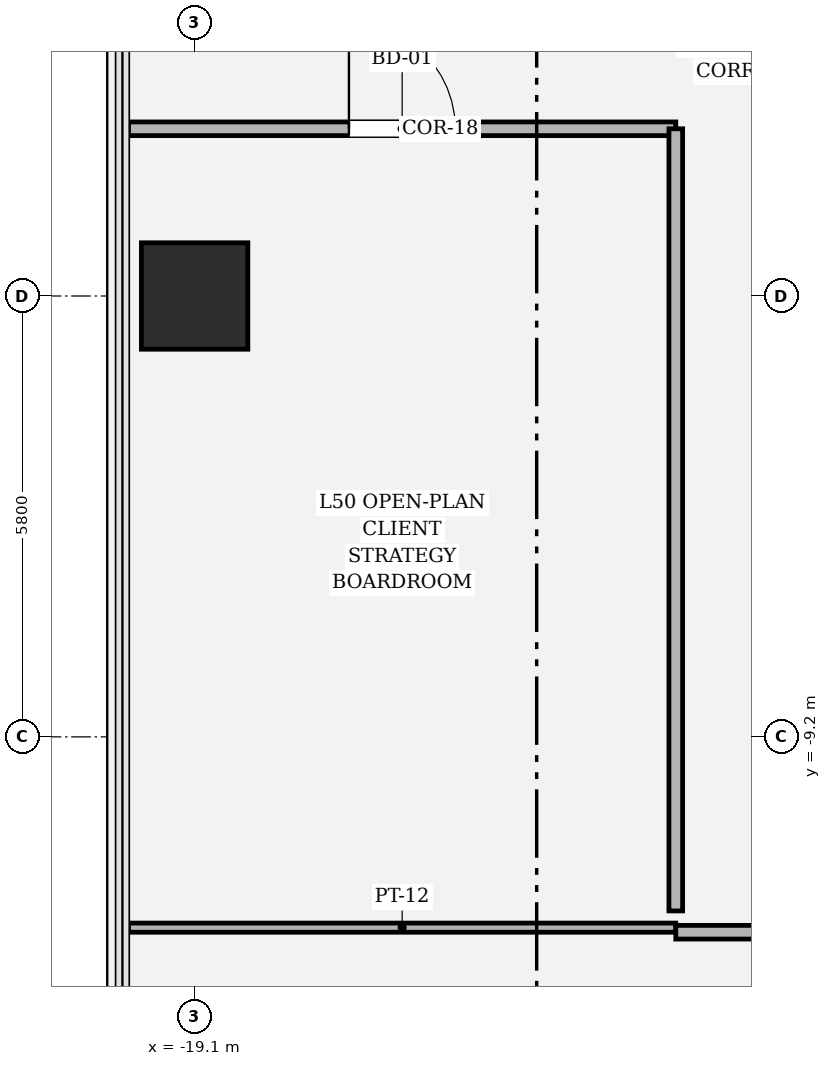
"""IFC4 building model, lengths in metres.
Left out: names, types, materials, properties, quantities, classifications, styles, units other than length and angle.
Written with IfcOpenShell. Run it as: python <this file> out.ifc"""

import sys

from ifc_helpers import new_model, si_unit, direction, frame, frame_2d, origin, origin_2d, place, context, subcontext, project, spatial, rectangle, hollow_rectangle, extrude, element, fill, save


model = new_model("IFC4")
c1 = context("Model", 3, precision=1e-05, world=origin(), true_north=direction((0.0, 1.0)))
c2 = subcontext(c1, "Body", "Model", "MODEL_VIEW")
j1 = project(units=[si_unit("LENGTHUNIT", "METRE"), si_unit("PLANEANGLEUNIT", "RADIAN")], contexts=[c1])
p1 = place(None, origin())
s1 = spatial("IfcSite", under=j1, at=p1, CompositionType="ELEMENT")
p2 = place(p1, origin())
s2 = spatial("IfcBuilding", under=s1, at=p2, CompositionType="ELEMENT")
p3 = place(p2, frame((0.0, 0.0, 212.7)))
s3 = spatial("IfcBuildingStorey", under=s2, at=p3, CompositionType="ELEMENT", Elevation=212.7)
p4 = place(p3, frame((-19.1, -3.4, 0.0), z_axis=(0.0, 0.0, 1.0), x_axis=(1.0, 0.0, 0.0)))
e1 = element("IfcColumn", 1, at=p4, inside=s3, PredefinedType="COLUMN", context=c2, shape_type="SweptSolid", body=[
    extrude(hollow_rectangle(XDim=1.4, YDim=1.4, WallThickness=0.042, at=origin_2d()), origin(), (0.0, 0.0, 1.0), 4.05),
])
p5 = place(p3, frame((-19.97, -11.71, 0.0), z_axis=(0.0, 0.0, 1.0), x_axis=(1.0, 0.0, 0.0)))
e2 = element("IfcWall", 2, at=p5, inside=s3, PredefinedType="PARTITIONING", context=c2, shape_type="SweptSolid", body=[
    extrude(rectangle(XDim=7.2, YDim=0.12, at=frame_2d((3.6, 0.0))), origin(), (0.0, 0.0, 1.0), 3.174),
])
p6 = place(p3, frame((-12.77, -11.77, 0.0), z_axis=(0.0, 0.0, 1.0), x_axis=(1.0, 0.0, 0.0)))
e3 = element("IfcWall", 3, at=p6, inside=s3, PredefinedType="PARTITIONING", context=c2, shape_type="SweptSolid", body=[
    extrude(rectangle(XDim=25.54, YDim=0.18, at=frame_2d((12.77, 0.0))), origin(), (0.0, 0.0, 1.0), 3.174),
])
p7 = place(p6, frame((12.07, 0.0, 0.0)))
e4 = element("IfcOpeningElement", 4, at=p7, cuts=e3, PredefinedType="OPENING", context=c2, shape_type="SweptSolid", body=[
    extrude(rectangle(XDim=1.4, YDim=2.25, at=frame_2d((0.7, 1.125))), frame((0.0, 0.1, 0.0), z_axis=(0.0, -1.0, 0.0), x_axis=(1.0, 0.0, 0.0)), (0.0, 0.0, 1.0), 0.2),
])
p8 = place(p3, frame((-19.97, -1.2, 0.0), z_axis=(0.0, 0.0, 1.0), x_axis=(1.0, 0.0, 0.0)))
e5 = element("IfcWall", 5, at=p8, inside=s3, PredefinedType="PARTITIONING", context=c2, shape_type="SweptSolid", body=[
    extrude(rectangle(XDim=7.2, YDim=0.18, at=frame_2d((3.6, 0.0))), origin(), (0.0, 0.0, 1.0), 3.174),
])
p9 = place(p8, frame((2.9, 0.0, 0.0)))
e6 = element("IfcOpeningElement", 6, at=p9, cuts=e5, PredefinedType="OPENING", context=c2, shape_type="SweptSolid", body=[
    extrude(rectangle(XDim=1.4, YDim=2.25, at=frame_2d((0.7, 1.125))), frame((0.0, 0.1, 0.0), z_axis=(0.0, -1.0, 0.0), x_axis=(1.0, 0.0, 0.0)), (0.0, 0.0, 1.0), 0.2),
])
p10 = place(p3, frame((-12.77, -1.2, 0.0), z_axis=(0.0, 0.0, 1.0), x_axis=(0.0, -1.0, 0.0)))
e7 = element("IfcWall", 7, at=p10, inside=s3, PredefinedType="PARTITIONING", context=c2, shape_type="SweptSolid", body=[
    extrude(rectangle(XDim=10.29, YDim=0.18, at=frame_2d((5.145, 0.0))), origin(), (0.0, 0.0, 1.0), 3.174),
])
p11 = place(p9, origin())
e8 = element("IfcDoor", 8, at=p11, inside=s3, OperationType="SINGLE_SWING_LEFT", PredefinedType="DOOR", context=c2, shape_type="SweptSolid", body=[
    extrude(rectangle(XDim=1.4, YDim=2.25, at=frame_2d((0.7, 1.125))), frame((0.0, 0.025, 0.0), z_axis=(0.0, -1.0, 0.0), x_axis=(1.0, 0.0, 0.0)), (0.0, 0.0, 1.0), 0.05),
])
fill(e6, e8)
save(model, sys.argv[1])
